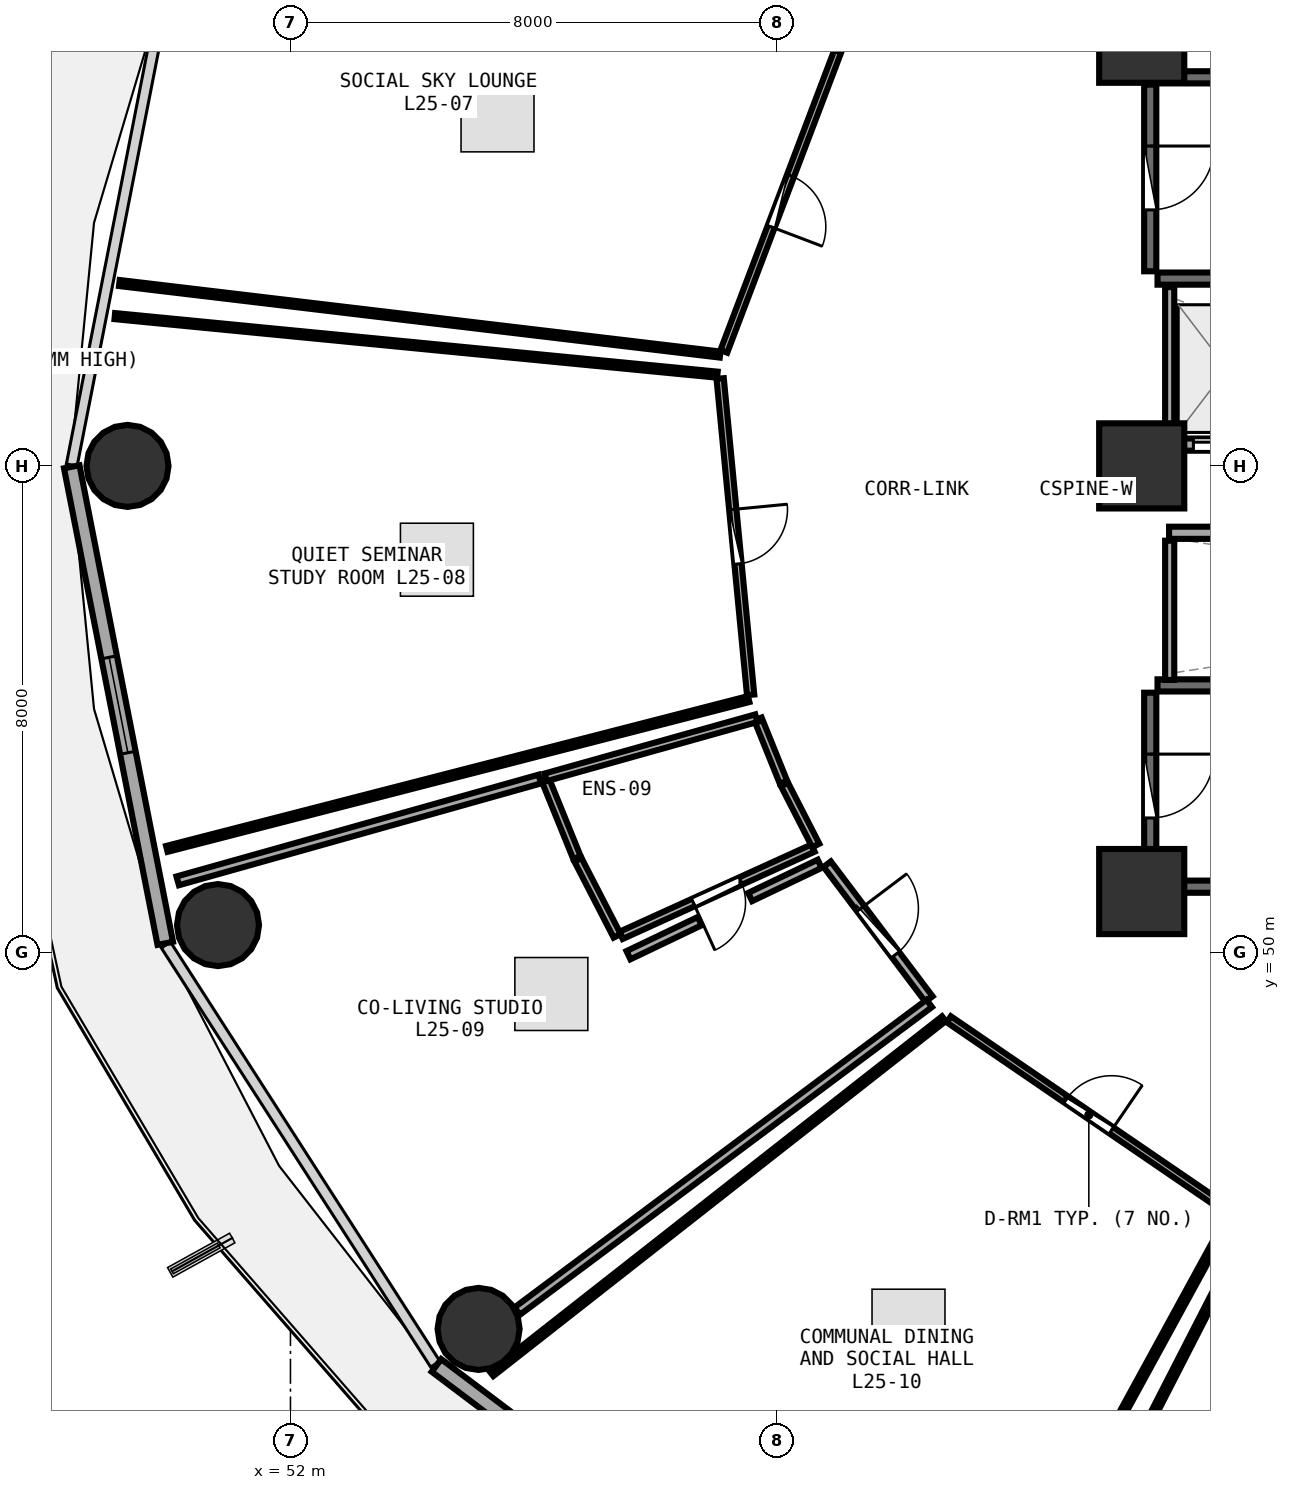
"""IFC4 building model, lengths in metres.
Left out: names, types, materials, properties, quantities, classifications, styles, units other than length and angle.
Written with IfcOpenShell. Run it as: python <this file> out.ifc"""

import sys

from ifc_helpers import new_model, si_unit, direction, frame, frame_2d, origin, origin_2d, place, context, subcontext, project, spatial, rectangle, circle, extrude, element, fill, save


model = new_model("IFC4")
c1 = context("Model", 3, precision=1e-05, world=origin(), true_north=direction((0.0, 1.0)))
c2 = subcontext(c1, "Body", "Model", "MODEL_VIEW")
j1 = project(units=[si_unit("LENGTHUNIT", "METRE"), si_unit("PLANEANGLEUNIT", "RADIAN")], contexts=[c1])
p1 = place(None, origin())
s1 = spatial("IfcSite", under=j1, at=p1, CompositionType="ELEMENT")
p2 = place(p1, origin())
s2 = spatial("IfcBuilding", under=s1, at=p2, CompositionType="ELEMENT")
p3 = place(p2, frame((0.0, 0.0, 98.85)))
s3 = spatial("IfcBuildingStorey", under=s2, at=p3, CompositionType="ELEMENT", Elevation=98.85)
for number, where, z_axis, x_axis in (
    (1, (66.0, 51.0, 0.0), (0.0, 0.0, 1.0), (1.0, 0.0, 0.0)),
    (2, (66.0, 65.0, 0.0), (0.0, 0.0, 1.0), (1.0, 0.0, 0.0)),
    (3, (66.0, 58.0, 0.0), (0.0, 0.0, 1.0), (1.0, 0.0, 0.0)),
):
    element("IfcColumn", number, at=place(p3, frame(where, z_axis=z_axis, x_axis=x_axis)), inside=s3, PredefinedType="PILASTER", context=c2, shape_type="SweptSolid", body=[
        extrude(rectangle(XDim=1.4, YDim=1.4, at=origin_2d()), origin(), (0.0, 0.0, 1.0), 3.75),
    ])
for number, where, z_axis, x_axis in (
    (4, (49.32, 58.0, 0.0), (0.0, 0.0, 1.0), (1.0, 0.0, 0.0)),
    (5, (50.808, 50.448, 0.0), (0.0, 0.0, 1.0), (1.0, 0.0, 0.0)),
    (6, (55.094, 43.807, 0.0), (0.0, 0.0, 1.0), (1.0, 0.0, 0.0)),
):
    element("IfcColumn", number, at=place(p3, frame(where, z_axis=z_axis, x_axis=x_axis)), inside=s3, PredefinedType="COLUMN", context=c2, shape_type="SweptSolid", body=[
        extrude(circle(Radius=0.675, at=origin_2d()), origin(), (0.0, 0.0, 1.0), 3.75),
    ])
p4 = place(p3, frame((48.403, 57.985, 0.0), z_axis=(0.0, 0.0, 1.0), x_axis=(0.192581843632, -0.981280914674, 0.0)))
e7 = element("IfcWall", 7, at=p4, inside=s3, PredefinedType="SOLIDWALL", context=c2, shape_type="SweptSolid", body=[
    extrude(rectangle(XDim=7.987, YDim=0.26, at=frame_2d((3.993, 0.0))), origin(), (0.0, 0.0, 1.0), 3.475),
])
p5 = place(p4, frame((3.193, 0.0, 0.85)))
e8 = element("IfcOpeningElement", 8, at=p5, cuts=e7, PredefinedType="OPENING", context=c2, shape_type="SweptSolid", body=[
    extrude(rectangle(XDim=1.6, YDim=1.45, at=frame_2d((0.8, 0.725))), frame((0.0, 0.14, 0.0), z_axis=(0.0, -1.0, 0.0), x_axis=(1.0, 0.0, 0.0)), (0.0, 0.0, 1.0), 0.28),
])
p6 = place(p3, frame((54.401, 43.207, 0.0), z_axis=(0.0, 0.0, 1.0), x_axis=(0.798501507879, -0.601992808857, 0.0)))
e9 = element("IfcWall", 9, at=p6, inside=s3, PredefinedType="SOLIDWALL", context=c2, shape_type="SweptSolid", body=[
    extrude(rectangle(XDim=8.499, YDim=0.26, at=frame_2d((4.25, 0.0))), origin(), (0.0, 0.0, 1.0), 3.475),
])
p7 = place(p6, frame((3.45, 0.0, 0.85)))
e10 = element("IfcOpeningElement", 10, at=p7, cuts=e9, PredefinedType="OPENING", context=c2, shape_type="SweptSolid", body=[
    extrude(rectangle(XDim=1.6, YDim=1.45, at=frame_2d((0.8, 0.725))), frame((0.0, 0.14, 0.0), z_axis=(0.0, -1.0, 0.0), x_axis=(1.0, 0.0, 0.0)), (0.0, 0.0, 1.0), 0.28),
])
for number, where, z_axis, x_axis in (
    (11, (66.26, 61.08, 0.0), (0.0, 0.0, 1.0), (1.0, 0.0, 0.0)),
    (12, (73.42, 64.39, 0.0), (0.0, 0.0, 1.0), (-1.0, 0.0, 0.0)),
):
    element("IfcWall", number, at=place(p3, frame(where, z_axis=z_axis, x_axis=x_axis)), inside=s3, PredefinedType="SHEAR", context=c2, shape_type="SweptSolid", body=[
        extrude(rectangle(XDim=7.16, YDim=0.2, at=frame_2d((3.58, 0.0))), origin(), (0.0, 0.0, 1.0), 3.49),
    ])
p8 = place(p3, frame((66.14, 64.27, 0.0), z_axis=(0.0, 0.0, 1.0), x_axis=(0.0, -1.0, 0.0)))
e13 = element("IfcWall", 13, at=p8, inside=s3, PredefinedType="SHEAR", context=c2, shape_type="SweptSolid", body=[
    extrude(rectangle(XDim=3.07, YDim=0.2, at=frame_2d((1.535, 0.0))), origin(), (0.0, 0.0, 1.0), 3.49),
])
p9 = place(p8, frame((1.01, 0.0, 0.0)))
e14 = element("IfcOpeningElement", 14, at=p9, cuts=e13, PredefinedType="OPENING", context=c2, shape_type="SweptSolid", body=[
    extrude(rectangle(XDim=1.05, YDim=2.1, at=frame_2d((0.525, 1.05))), frame((0.0, 0.11, 0.0), z_axis=(0.0, -1.0, 0.0), x_axis=(1.0, 0.0, 0.0)), (0.0, 0.0, 1.0), 0.22),
])
for number, where, z_axis, x_axis in (
    (15, (66.26, 51.08, 0.0), (0.0, 0.0, 1.0), (1.0, 0.0, 0.0)),
    (16, (73.42, 54.39, 0.0), (0.0, 0.0, 1.0), (-1.0, 0.0, 0.0)),
):
    element("IfcWall", number, at=place(p3, frame(where, z_axis=z_axis, x_axis=x_axis)), inside=s3, PredefinedType="SHEAR", context=c2, shape_type="SweptSolid", body=[
        extrude(rectangle(XDim=7.16, YDim=0.2, at=frame_2d((3.58, 0.0))), origin(), (0.0, 0.0, 1.0), 3.49),
    ])
p10 = place(p3, frame((66.14, 54.27, 0.0), z_axis=(0.0, 0.0, 1.0), x_axis=(0.0, -1.0, 0.0)))
e17 = element("IfcWall", 17, at=p10, inside=s3, PredefinedType="SHEAR", context=c2, shape_type="SweptSolid", body=[
    extrude(rectangle(XDim=3.07, YDim=0.2, at=frame_2d((1.535, 0.0))), origin(), (0.0, 0.0, 1.0), 3.49),
])
p11 = place(p10, frame((1.01, 0.0, 0.0)))
e18 = element("IfcOpeningElement", 18, at=p11, cuts=e17, PredefinedType="OPENING", context=c2, shape_type="SweptSolid", body=[
    extrude(rectangle(XDim=1.05, YDim=2.1, at=frame_2d((0.525, 1.05))), frame((0.0, 0.11, 0.0), z_axis=(0.0, -1.0, 0.0), x_axis=(1.0, 0.0, 0.0)), (0.0, 0.0, 1.0), 0.22),
])
p12 = place(p3, frame((66.45, 58.35, 0.0), z_axis=(0.0, 0.0, 1.0), x_axis=(1.0, 0.0, 0.0)))
e19 = element("IfcWall", 19, at=p12, inside=s3, PredefinedType="SOLIDWALL", context=c2, shape_type="SweptSolid", body=[
    extrude(rectangle(XDim=6.0, YDim=0.2, at=frame_2d((3.0, 0.0))), origin(), (0.0, 0.0, 1.0), 3.48),
])
p13 = place(p12, frame((0.4, 0.0, 0.0)))
e20 = element("IfcOpeningElement", 20, at=p13, cuts=e19, PredefinedType="OPENING", context=c2, shape_type="SweptSolid", body=[
    extrude(rectangle(XDim=1.1, YDim=2.1, at=frame_2d((0.55, 1.05))), frame((0.0, 0.11, 0.0), z_axis=(0.0, -1.0, 0.0), x_axis=(1.0, 0.0, 0.0)), (0.0, 0.0, 1.0), 0.22),
])
p14 = place(p12, frame((2.4, 0.0, 0.0)))
e21 = element("IfcOpeningElement", 21, at=p14, cuts=e19, PredefinedType="OPENING", context=c2, shape_type="SweptSolid", body=[
    extrude(rectangle(XDim=1.1, YDim=2.1, at=frame_2d((0.55, 1.05))), frame((0.0, 0.11, 0.0), z_axis=(0.0, -1.0, 0.0), x_axis=(1.0, 0.0, 0.0)), (0.0, 0.0, 1.0), 0.22),
])
p15 = place(p12, frame((4.4, 0.0, 0.0)))
e22 = element("IfcOpeningElement", 22, at=p15, cuts=e19, PredefinedType="OPENING", context=c2, shape_type="SweptSolid", body=[
    extrude(rectangle(XDim=1.1, YDim=2.1, at=frame_2d((0.55, 1.05))), frame((0.0, 0.11, 0.0), z_axis=(0.0, -1.0, 0.0), x_axis=(1.0, 0.0, 0.0)), (0.0, 0.0, 1.0), 0.22),
])
p16 = place(p3, frame((66.46, 58.48, 0.0), z_axis=(0.0, 0.0, 1.0), x_axis=(0.0, 1.0, 0.0)))
e23 = element("IfcWall", 23, at=p16, inside=s3, PredefinedType="PARTITIONING", context=c2, shape_type="SweptSolid", body=[
    extrude(rectangle(XDim=2.46, YDim=0.15, at=frame_2d((1.23, 0.0))), origin(), (0.0, 0.0, 1.0), 3.48),
])
p17 = place(p3, frame((66.45, 56.9, 0.0), z_axis=(0.0, 0.0, 1.0), x_axis=(1.0, 0.0, 0.0)))
e24 = element("IfcWall", 24, at=p17, inside=s3, PredefinedType="SOLIDWALL", context=c2, shape_type="SweptSolid", body=[
    extrude(rectangle(XDim=14.4, YDim=0.2, at=frame_2d((7.2, 0.0))), origin(), (0.0, 0.0, 1.0), 3.48),
])
p18 = place(p3, frame((66.46, 54.48, 0.0), z_axis=(0.0, 0.0, 1.0), x_axis=(0.0, 1.0, 0.0)))
e25 = element("IfcWall", 25, at=p18, inside=s3, PredefinedType="PARTITIONING", context=c2, shape_type="SweptSolid", body=[
    extrude(rectangle(XDim=2.29, YDim=0.15, at=frame_2d((1.145, 0.0))), origin(), (0.0, 0.0, 1.0), 3.48),
])
p19 = place(p3, frame((61.002, 64.821, 0.0), z_axis=(0.0, 0.0, 1.0), x_axis=(-0.354853458438, -0.934921934193, 0.0)))
e26 = element("IfcWall", 26, at=p19, inside=s3, PredefinedType="PARTITIONING", context=c2, shape_type="SweptSolid", body=[
    extrude(rectangle(XDim=5.282, YDim=0.12, at=frame_2d((2.641, 0.0))), origin(), (0.0, 0.0, 1.0), 3.235),
])
p20 = place(p19, frame((2.191, 0.0, 0.0)))
e27 = element("IfcOpeningElement", 27, at=p20, cuts=e26, PredefinedType="OPENING", context=c2, shape_type="SweptSolid", body=[
    extrude(rectangle(XDim=0.9, YDim=2.08, at=frame_2d((0.45, 1.04))), frame((0.0, 0.07, 0.0), z_axis=(0.0, -1.0, 0.0), x_axis=(1.0, 0.0, 0.0)), (0.0, 0.0, 1.0), 0.14),
])
p21 = place(p3, frame((59.067, 59.436, 0.0), z_axis=(0.0, 0.0, 1.0), x_axis=(0.095913591475, -0.995389663886, 0.0)))
e28 = element("IfcWall", 28, at=p21, inside=s3, PredefinedType="PARTITIONING", context=c2, shape_type="SweptSolid", body=[
    extrude(rectangle(XDim=5.226, YDim=0.12, at=frame_2d((2.613, 0.0))), origin(), (0.0, 0.0, 1.0), 2.925),
])
p22 = place(p21, frame((2.163, 0.0, 0.0)))
e29 = element("IfcOpeningElement", 29, at=p22, cuts=e28, PredefinedType="OPENING", context=c2, shape_type="SweptSolid", body=[
    extrude(rectangle(XDim=0.9, YDim=2.08, at=frame_2d((0.45, 1.04))), frame((0.0, 0.07, 0.0), z_axis=(0.0, -1.0, 0.0), x_axis=(1.0, 0.0, 0.0)), (0.0, 0.0, 1.0), 0.14),
])
p23 = place(p3, frame((60.594, 51.714, 0.0), z_axis=(0.0, 0.0, 1.0), x_axis=(-0.910380938799, -0.413771127885, 0.0)))
e30 = element("IfcWall", 30, at=p23, inside=s3, PredefinedType="PLUMBINGWALL", context=c2, shape_type="SweptSolid", body=[
    extrude(rectangle(XDim=3.469, YDim=0.13, at=frame_2d((1.734, 0.0))), origin(), (0.0, 0.0, 1.0), 2.925),
])
p24 = place(p23, frame((1.304, 0.0, 0.0)))
e31 = element("IfcOpeningElement", 31, at=p24, cuts=e30, PredefinedType="OPENING", context=c2, shape_type="SweptSolid", body=[
    extrude(rectangle(XDim=0.86, YDim=2.05, at=frame_2d((0.43, 1.025))), frame((0.0, 0.075, 0.0), z_axis=(0.0, -1.0, 0.0), x_axis=(1.0, 0.0, 0.0)), (0.0, 0.0, 1.0), 0.15),
])
p25 = place(p3, frame((60.827, 51.45, 0.0), z_axis=(0.0, 0.0, 1.0), x_axis=(0.602330864847, -0.798246534131, 0.0)))
e32 = element("IfcWall", 32, at=p25, inside=s3, PredefinedType="PARTITIONING", context=c2, shape_type="SweptSolid", body=[
    extrude(rectangle(XDim=2.779, YDim=0.15, at=frame_2d((1.389, 0.0))), origin(), (0.0, 0.0, 1.0), 2.925),
])
p26 = place(p25, frame((0.914, 0.0, 0.0)))
e33 = element("IfcOpeningElement", 33, at=p26, cuts=e32, PredefinedType="OPENING", context=c2, shape_type="SweptSolid", body=[
    extrude(rectangle(XDim=0.95, YDim=2.08, at=frame_2d((0.475, 1.04))), frame((0.0, 0.085, 0.0), z_axis=(0.0, -1.0, 0.0), x_axis=(1.0, 0.0, 0.0)), (0.0, 0.0, 1.0), 0.17),
])
p27 = place(p3, frame((62.827, 48.899, 0.0), z_axis=(0.0, 0.0, 1.0), x_axis=(0.825618475233, -0.564228795219, 0.0)))
e34 = element("IfcWall", 34, at=p27, inside=s3, PredefinedType="PARTITIONING", context=c2, shape_type="SweptSolid", body=[
    extrude(rectangle(XDim=5.578, YDim=0.12, at=frame_2d((2.789, 0.0))), origin(), (0.0, 0.0, 1.0), 2.925),
])
p28 = place(p27, frame((2.339, 0.0, 0.0)))
e35 = element("IfcOpeningElement", 35, at=p28, cuts=e34, PredefinedType="OPENING", context=c2, shape_type="SweptSolid", body=[
    extrude(rectangle(XDim=0.9, YDim=2.08, at=frame_2d((0.45, 1.04))), frame((0.0, 0.07, 0.0), z_axis=(0.0, -1.0, 0.0), x_axis=(1.0, 0.0, 0.0)), (0.0, 0.0, 1.0), 0.14),
])
p29 = place(p3, frame((59.066, 59.831, 0.0), z_axis=(0.0, 0.0, 1.0), x_axis=(-0.99298532521, 0.118237658624, 0.0)))
e36 = element("IfcWall", 36, at=p29, inside=s3, PredefinedType="PARTITIONING", context=c2, shape_type="SweptSolid", body=[
    extrude(rectangle(XDim=9.95, YDim=0.1, at=frame_2d((4.975, 0.0))), origin(), (0.0, 0.0, 1.0), 2.975),
])
p30 = place(p3, frame((59.535, 54.165, 0.0), z_axis=(0.0, 0.0, 1.0), x_axis=(-0.968404670054, -0.249384031201, 0.0)))
e37 = element("IfcWall", 37, at=p30, inside=s3, PredefinedType="PARTITIONING", context=c2, shape_type="SweptSolid", body=[
    extrude(rectangle(XDim=9.881, YDim=0.1, at=frame_2d((4.94, 0.0))), origin(), (0.0, 0.0, 1.0), 2.975),
])
p31 = place(p3, frame((49.111, 60.463, 0.0), z_axis=(0.0, 0.0, 1.0), x_axis=(0.995310801703, -0.096728527399, 0.0)))
e38 = element("IfcWall", 38, at=p31, inside=s3, PredefinedType="PARTITIONING", context=c2, shape_type="SweptSolid", body=[
    extrude(rectangle(XDim=9.957, YDim=0.1, at=frame_2d((4.979, 0.0))), origin(), (0.0, 0.0, 1.0), 2.975),
])
p32 = place(p3, frame((59.688, 53.837, 0.0), z_axis=(0.0, 0.0, 1.0), x_axis=(0.374466649307, -0.927240383372, 0.0)))
e39 = element("IfcWall", 39, at=p32, inside=s3, PredefinedType="PLUMBINGWALL", context=c2, shape_type="SweptSolid", body=[
    extrude(rectangle(XDim=1.121, YDim=0.13, at=frame_2d((0.561, 0.0))), origin(), (0.0, 0.0, 1.0), 3.235),
])
p33 = place(p3, frame((60.125, 52.761, 0.0), z_axis=(0.0, 0.0, 1.0), x_axis=(0.456189291516, -0.889882762113, 0.0)))
e40 = element("IfcWall", 40, at=p33, inside=s3, PredefinedType="PLUMBINGWALL", context=c2, shape_type="SweptSolid", body=[
    extrude(rectangle(XDim=1.129, YDim=0.13, at=frame_2d((0.564, 0.0))), origin(), (0.0, 0.0, 1.0), 3.235),
])
p34 = place(p3, frame((57.373, 50.272, 0.0), z_axis=(0.0, 0.0, 1.0), x_axis=(-0.458147751042, 0.888876053348, 0.0)))
e41 = element("IfcWall", 41, at=p34, inside=s3, PredefinedType="PLUMBINGWALL", context=c2, shape_type="SweptSolid", body=[
    extrude(rectangle(XDim=1.407, YDim=0.13, at=frame_2d((0.703, 0.0))), origin(), (0.0, 0.0, 1.0), 2.925),
])
p35 = place(p3, frame((56.711, 51.559, 0.0), z_axis=(0.0, 0.0, 1.0), x_axis=(-0.376021150564, 0.926611080405, 0.0)))
e42 = element("IfcWall", 42, at=p35, inside=s3, PredefinedType="PLUMBINGWALL", context=c2, shape_type="SweptSolid", body=[
    extrude(rectangle(XDim=1.398, YDim=0.13, at=frame_2d((0.699, 0.0))), origin(), (0.0, 0.0, 1.0), 3.175),
])
p36 = place(p3, frame((56.197, 52.878, 0.0), z_axis=(0.0, 0.0, 1.0), x_axis=(0.962808829557, 0.270183563023, 0.0)))
e43 = element("IfcWall", 43, at=p36, inside=s3, PredefinedType="PLUMBINGWALL", context=c2, shape_type="SweptSolid", body=[
    extrude(rectangle(XDim=3.598, YDim=0.13, at=frame_2d((1.799, 0.0))), origin(), (0.0, 0.0, 1.0), 3.175),
])
p37 = place(p3, frame((62.505, 49.16, 0.0), z_axis=(0.0, 0.0, 1.0), x_axis=(-0.801231684565, -0.598354232582, 0.0)))
e44 = element("IfcWall", 44, at=p37, inside=s3, PredefinedType="PARTITIONING", context=c2, shape_type="SweptSolid", body=[
    extrude(rectangle(XDim=8.456, YDim=0.15, at=frame_2d((4.228, 0.0))), origin(), (0.0, 0.0, 1.0), 2.925),
])
p38 = place(p3, frame((50.146, 51.176, 0.0), z_axis=(0.0, 0.0, 1.0), x_axis=(0.962685643461, 0.270622157028, 0.0)))
e45 = element("IfcWall", 45, at=p38, inside=s3, PredefinedType="PARTITIONING", context=c2, shape_type="SweptSolid", body=[
    extrude(rectangle(XDim=6.187, YDim=0.15, at=frame_2d((3.094, 0.0))), origin(), (0.0, 0.0, 1.0), 2.975),
])
p39 = place(p3, frame((57.559, 49.953, 0.0), z_axis=(0.0, 0.0, 1.0), x_axis=(0.902185129063, 0.431349038364, 0.0)))
e46 = element("IfcWall", 46, at=p39, inside=s3, PredefinedType="PARTITIONING", context=c2, shape_type="SweptSolid", body=[
    extrude(rectangle(XDim=1.298, YDim=0.15, at=frame_2d((0.649, 0.0))), origin(), (0.0, 0.0, 1.0), 3.175),
])
p40 = place(p3, frame((59.561, 50.91, 0.0), z_axis=(0.0, 0.0, 1.0), x_axis=(0.902228812368, 0.431257660955, 0.0)))
e47 = element("IfcWall", 47, at=p40, inside=s3, PredefinedType="PARTITIONING", context=c2, shape_type="SweptSolid", body=[
    extrude(rectangle(XDim=1.266, YDim=0.15, at=frame_2d((0.633, 0.0))), origin(), (0.0, 0.0, 1.0), 2.925),
])
p41 = place(p3, frame((67.463, 45.683, 0.0), z_axis=(0.0, 0.0, 1.0), x_axis=(-0.479571724153, -0.87750268455, 0.0)))
e48 = element("IfcWall", 48, at=p41, inside=s3, PredefinedType="PARTITIONING", context=c2, shape_type="SweptSolid", body=[
    extrude(rectangle(XDim=9.007, YDim=0.1, at=frame_2d((4.503, 0.0))), origin(), (0.0, 0.0, 1.0), 2.925),
])
p42 = place(p3, frame((55.305, 43.071, 0.0), z_axis=(0.0, 0.0, 1.0), x_axis=(0.78679196563, 0.6172182781, 0.0)))
e49 = element("IfcWall", 49, at=p42, inside=s3, PredefinedType="PARTITIONING", context=c2, shape_type="SweptSolid", body=[
    extrude(rectangle(XDim=9.458, YDim=0.1, at=frame_2d((4.729, 0.0))), origin(), (0.0, 0.0, 1.0), 2.925),
])
p43 = place(p3, frame((63.697, 37.548, 0.0), z_axis=(0.0, 0.0, 1.0), x_axis=(0.456266444918, 0.889843205987, 0.0)))
e50 = element("IfcWall", 50, at=p43, inside=s3, PredefinedType="PARTITIONING", context=c2, shape_type="SweptSolid", body=[
    extrude(rectangle(XDim=8.985, YDim=0.1, at=frame_2d((4.492, 0.0))), origin(), (0.0, 0.0, 1.0), 2.925),
])
p44 = place(p5, origin())
e51 = element("IfcWindow", 51, at=p44, inside=s3, PartitioningType="SINGLE_PANEL", PredefinedType="WINDOW", context=c2, shape_type="SweptSolid", body=[
    extrude(rectangle(XDim=1.6, YDim=1.45, at=frame_2d((0.8, 0.725))), frame((0.0, 0.03, 0.0), z_axis=(0.0, -1.0, 0.0), x_axis=(1.0, 0.0, 0.0)), (0.0, 0.0, 1.0), 0.06),
])
fill(e8, e51)
p45 = place(p9, origin())
e52 = element("IfcDoor", 52, at=p45, inside=s3, OperationType="SINGLE_SWING_LEFT", PredefinedType="DOOR", context=c2, shape_type="SweptSolid", body=[
    extrude(rectangle(XDim=1.05, YDim=2.1, at=frame_2d((0.525, 1.05))), frame((0.0, 0.025, 0.0), z_axis=(0.0, -1.0, 0.0), x_axis=(1.0, 0.0, 0.0)), (0.0, 0.0, 1.0), 0.05),
])
fill(e14, e52)
p46 = place(p11, origin())
e53 = element("IfcDoor", 53, at=p46, inside=s3, OperationType="SINGLE_SWING_LEFT", PredefinedType="DOOR", context=c2, shape_type="SweptSolid", body=[
    extrude(rectangle(XDim=1.05, YDim=2.1, at=frame_2d((0.525, 1.05))), frame((0.0, 0.025, 0.0), z_axis=(0.0, -1.0, 0.0), x_axis=(1.0, 0.0, 0.0)), (0.0, 0.0, 1.0), 0.05),
])
fill(e18, e53)
p47 = place(p13, origin())
e54 = element("IfcDoor", 54, at=p47, inside=s3, OperationType="DOUBLE_DOOR_SLIDING", PredefinedType="DOOR", context=c2, shape_type="SweptSolid", body=[
    extrude(rectangle(XDim=1.1, YDim=2.1, at=frame_2d((0.55, 1.05))), frame((0.0, 0.025, 0.0), z_axis=(0.0, -1.0, 0.0), x_axis=(1.0, 0.0, 0.0)), (0.0, 0.0, 1.0), 0.05),
])
fill(e20, e54)
p48 = place(p20, origin())
e55 = element("IfcDoor", 55, at=p48, inside=s3, OperationType="SINGLE_SWING_RIGHT", PredefinedType="DOOR", context=c2, shape_type="SweptSolid", body=[
    extrude(rectangle(XDim=0.9, YDim=2.08, at=frame_2d((0.45, 1.04))), frame((0.0, 0.025, 0.0), z_axis=(0.0, -1.0, 0.0), x_axis=(1.0, 0.0, 0.0)), (0.0, 0.0, 1.0), 0.05),
])
fill(e27, e55)
p49 = place(p22, origin())
e56 = element("IfcDoor", 56, at=p49, inside=s3, OperationType="SINGLE_SWING_LEFT", PredefinedType="DOOR", context=c2, shape_type="SweptSolid", body=[
    extrude(rectangle(XDim=0.9, YDim=2.08, at=frame_2d((0.45, 1.04))), frame((0.0, 0.025, 0.0), z_axis=(0.0, -1.0, 0.0), x_axis=(1.0, 0.0, 0.0)), (0.0, 0.0, 1.0), 0.05),
])
fill(e29, e56)
p50 = place(p24, origin())
e57 = element("IfcDoor", 57, at=p50, inside=s3, OperationType="SINGLE_SWING_RIGHT", PredefinedType="DOOR", context=c2, shape_type="SweptSolid", body=[
    extrude(rectangle(XDim=0.86, YDim=2.05, at=frame_2d((0.43, 1.025))), frame((0.0, 0.025, 0.0), z_axis=(0.0, -1.0, 0.0), x_axis=(1.0, 0.0, 0.0)), (0.0, 0.0, 1.0), 0.05),
])
fill(e31, e57)
p51 = place(p26, origin())
e58 = element("IfcDoor", 58, at=p51, inside=s3, OperationType="SINGLE_SWING_LEFT", PredefinedType="DOOR", context=c2, shape_type="SweptSolid", body=[
    extrude(rectangle(XDim=0.95, YDim=2.08, at=frame_2d((0.475, 1.04))), frame((0.0, 0.025, 0.0), z_axis=(0.0, -1.0, 0.0), x_axis=(1.0, 0.0, 0.0)), (0.0, 0.0, 1.0), 0.05),
])
fill(e33, e58)
p52 = place(p28, origin())
e59 = element("IfcDoor", 59, at=p52, inside=s3, OperationType="SINGLE_SWING_RIGHT", PredefinedType="DOOR", context=c2, shape_type="SweptSolid", body=[
    extrude(rectangle(XDim=0.9, YDim=2.08, at=frame_2d((0.45, 1.04))), frame((0.0, 0.025, 0.0), z_axis=(0.0, -1.0, 0.0), x_axis=(1.0, 0.0, 0.0)), (0.0, 0.0, 1.0), 0.05),
])
fill(e35, e59)
save(model, sys.argv[1])
